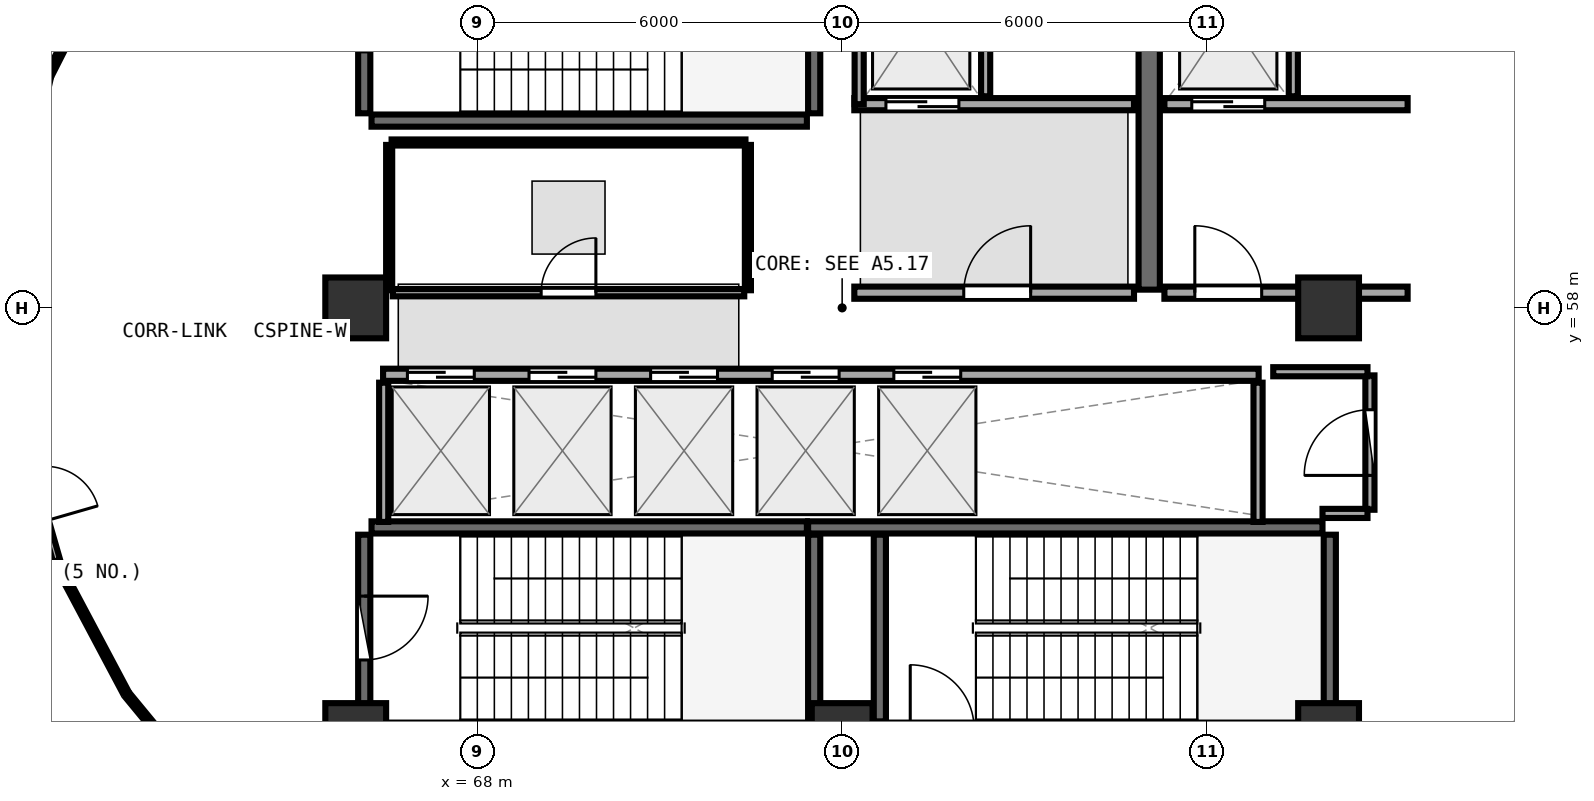
"""IFC4 building model, lengths in metres.
Left out: names, types, materials, properties, quantities, classifications, styles, units other than length and angle.
Written with IfcOpenShell. Run it as: python <this file> out.ifc"""

import sys

from ifc_helpers import new_model, si_unit, direction, frame, frame_2d, origin, origin_2d, place, context, subcontext, project, spatial, rectangle, extrude, element, fill, save


model = new_model("IFC4")
c1 = context("Model", 3, precision=1e-05, world=origin(), true_north=direction((0.0, 1.0)))
c2 = subcontext(c1, "Body", "Model", "MODEL_VIEW")
j1 = project(units=[si_unit("LENGTHUNIT", "METRE"), si_unit("PLANEANGLEUNIT", "RADIAN")], contexts=[c1])
p1 = place(None, origin())
s1 = spatial("IfcSite", under=j1, at=p1, CompositionType="ELEMENT")
p2 = place(p1, origin())
s2 = spatial("IfcBuilding", under=s1, at=p2, CompositionType="ELEMENT")
p3 = place(p2, frame((0.0, 0.0, 238.2)))
s3 = spatial("IfcBuildingStorey", under=s2, at=p3, CompositionType="ELEMENT", Elevation=238.2)
for number, where, z_axis, x_axis in (
    (1, (66.0, 51.0, 0.0), (0.0, 0.0, 1.0), (1.0, 0.0, 0.0)),
    (2, (74.0, 51.0, 0.0), (0.0, 0.0, 1.0), (1.0, 0.0, 0.0)),
    (3, (82.0, 51.0, 0.0), (0.0, 0.0, 1.0), (1.0, 0.0, 0.0)),
    (4, (82.0, 58.0, 0.0), (0.0, 0.0, 1.0), (1.0, 0.0, 0.0)),
    (5, (66.0, 58.0, 0.0), (0.0, 0.0, 1.0), (1.0, 0.0, 0.0)),
):
    element("IfcColumn", number, at=place(p3, frame(where, z_axis=z_axis, x_axis=x_axis)), inside=s3, PredefinedType="PILASTER", context=c2, shape_type="SweptSolid", body=[
        extrude(rectangle(XDim=1.0, YDim=1.0, at=origin_2d()), origin(), (0.0, 0.0, 1.0), 4.76),
    ])
p4 = place(p3, frame((66.26, 61.08, 0.0), z_axis=(0.0, 0.0, 1.0), x_axis=(1.0, 0.0, 0.0)))
e6 = element("IfcWall", 6, at=p4, inside=s3, PredefinedType="SHEAR", context=c2, shape_type="SweptSolid", body=[
    extrude(rectangle(XDim=7.16, YDim=0.2, at=frame_2d((3.58, 0.0))), origin(), (0.0, 0.0, 1.0), 4.36),
])
p5 = place(p3, frame((73.54, 61.2, 0.0), z_axis=(0.0, 0.0, 1.0), x_axis=(0.0, 1.0, 0.0)))
e7 = element("IfcWall", 7, at=p5, inside=s3, PredefinedType="SHEAR", context=c2, shape_type="SweptSolid", body=[
    extrude(rectangle(XDim=3.07, YDim=0.2, at=frame_2d((1.535, 0.0))), origin(), (0.0, 0.0, 1.0), 4.36),
])
p6 = place(p3, frame((66.14, 64.27, 0.0), z_axis=(0.0, 0.0, 1.0), x_axis=(0.0, -1.0, 0.0)))
e8 = element("IfcWall", 8, at=p6, inside=s3, PredefinedType="SHEAR", context=c2, shape_type="SweptSolid", body=[
    extrude(rectangle(XDim=3.07, YDim=0.2, at=frame_2d((1.535, 0.0))), origin(), (0.0, 0.0, 1.0), 4.36),
])
p7 = place(p6, frame((1.01, 0.0, 0.0)))
e9 = element("IfcOpeningElement", 9, at=p7, cuts=e8, PredefinedType="OPENING", context=c2, shape_type="SweptSolid", body=[
    extrude(rectangle(XDim=1.05, YDim=2.1, at=frame_2d((0.525, 1.05))), frame((0.0, 0.11, 0.0), z_axis=(0.0, -1.0, 0.0), x_axis=(1.0, 0.0, 0.0)), (0.0, 0.0, 1.0), 0.22),
])
p8 = place(p3, frame((82.02, 51.2, 0.0), z_axis=(0.0, 0.0, 1.0), x_axis=(0.0, 1.0, 0.0)))
e10 = element("IfcWall", 10, at=p8, inside=s3, PredefinedType="SHEAR", context=c2, shape_type="SweptSolid", body=[
    extrude(rectangle(XDim=3.07, YDim=0.2, at=frame_2d((1.535, 0.0))), origin(), (0.0, 0.0, 1.0), 4.36),
])
p9 = place(p3, frame((81.9, 54.39, 0.0), z_axis=(0.0, 0.0, 1.0), x_axis=(-1.0, 0.0, 0.0)))
e11 = element("IfcWall", 11, at=p9, inside=s3, PredefinedType="SHEAR", context=c2, shape_type="SweptSolid", body=[
    extrude(rectangle(XDim=8.46, YDim=0.2, at=frame_2d((4.23, 0.0))), origin(), (0.0, 0.0, 1.0), 4.36),
])
for number, where, z_axis, x_axis in (
    (12, (74.62, 54.27, 0.0), (0.0, 0.0, 1.0), (0.0, -1.0, 0.0)),
    (13, (73.54, 51.2, 0.0), (0.0, 0.0, 1.0), (0.0, 1.0, 0.0)),
):
    element("IfcWall", number, at=place(p3, frame(where, z_axis=z_axis, x_axis=x_axis)), inside=s3, PredefinedType="SHEAR", context=c2, shape_type="SweptSolid", body=[
        extrude(rectangle(XDim=3.07, YDim=0.2, at=frame_2d((1.535, 0.0))), origin(), (0.0, 0.0, 1.0), 4.36),
    ])
p10 = place(p3, frame((73.42, 54.39, 0.0), z_axis=(0.0, 0.0, 1.0), x_axis=(-1.0, 0.0, 0.0)))
e14 = element("IfcWall", 14, at=p10, inside=s3, PredefinedType="SHEAR", context=c2, shape_type="SweptSolid", body=[
    extrude(rectangle(XDim=7.16, YDim=0.2, at=frame_2d((3.58, 0.0))), origin(), (0.0, 0.0, 1.0), 4.36),
])
p11 = place(p3, frame((66.14, 54.27, 0.0), z_axis=(0.0, 0.0, 1.0), x_axis=(0.0, -1.0, 0.0)))
e15 = element("IfcWall", 15, at=p11, inside=s3, PredefinedType="SHEAR", context=c2, shape_type="SweptSolid", body=[
    extrude(rectangle(XDim=3.07, YDim=0.2, at=frame_2d((1.535, 0.0))), origin(), (0.0, 0.0, 1.0), 4.36),
])
p12 = place(p11, frame((1.01, 0.0, 0.0)))
e16 = element("IfcOpeningElement", 16, at=p12, cuts=e15, PredefinedType="OPENING", context=c2, shape_type="SweptSolid", body=[
    extrude(rectangle(XDim=1.05, YDim=2.1, at=frame_2d((0.525, 1.05))), frame((0.0, 0.11, 0.0), z_axis=(0.0, -1.0, 0.0), x_axis=(1.0, 0.0, 0.0)), (0.0, 0.0, 1.0), 0.22),
])
p13 = place(p3, frame((79.05, 58.3, 0.0), z_axis=(0.0, 0.0, 1.0), x_axis=(0.0, 1.0, 0.0)))
e17 = element("IfcWall", 17, at=p13, inside=s3, PredefinedType="SHEAR", context=c2, shape_type="SweptSolid", body=[
    extrude(rectangle(XDim=6.3, YDim=0.35, at=frame_2d((3.15, 0.0))), origin(), (0.0, 0.0, 1.0), 4.36),
])
p14 = place(p3, frame((74.2, 61.35, 0.0), z_axis=(0.0, 0.0, 1.0), x_axis=(1.0, 0.0, 0.0)))
e18 = element("IfcWall", 18, at=p14, inside=s3, PredefinedType="SOLIDWALL", context=c2, shape_type="SweptSolid", body=[
    extrude(rectangle(XDim=4.6, YDim=0.2, at=frame_2d((2.3, 0.0))), origin(), (0.0, 0.0, 1.0), 4.35),
])
p15 = place(p14, frame((0.52, 0.0, 0.0)))
e19 = element("IfcOpeningElement", 19, at=p15, cuts=e18, PredefinedType="OPENING", context=c2, shape_type="SweptSolid", body=[
    extrude(rectangle(XDim=1.2, YDim=2.15, at=frame_2d((0.6, 1.075))), frame((0.0, 0.11, 0.0), z_axis=(0.0, -1.0, 0.0), x_axis=(1.0, 0.0, 0.0)), (0.0, 0.0, 1.0), 0.22),
])
p16 = place(p3, frame((74.28, 61.35, 0.0), z_axis=(0.0, 0.0, 1.0), x_axis=(0.0, 1.0, 0.0)))
e20 = element("IfcWall", 20, at=p16, inside=s3, PredefinedType="PARTITIONING", context=c2, shape_type="SweptSolid", body=[
    extrude(rectangle(XDim=2.97, YDim=0.15, at=frame_2d((1.485, 0.0))), origin(), (0.0, 0.0, 1.0), 4.35),
])
p17 = place(p3, frame((76.36, 61.48, 0.0), z_axis=(0.0, 0.0, 1.0), x_axis=(0.0, 1.0, 0.0)))
e21 = element("IfcWall", 21, at=p17, inside=s3, PredefinedType="PARTITIONING", context=c2, shape_type="SweptSolid", body=[
    extrude(rectangle(XDim=2.84, YDim=0.15, at=frame_2d((1.42, 0.0))), origin(), (0.0, 0.0, 1.0), 4.35),
])
p18 = place(p3, frame((79.3, 61.35, 0.0), z_axis=(0.0, 0.0, 1.0), x_axis=(1.0, 0.0, 0.0)))
e22 = element("IfcWall", 22, at=p18, inside=s3, PredefinedType="SOLIDWALL", context=c2, shape_type="SweptSolid", body=[
    extrude(rectangle(XDim=4.0, YDim=0.2, at=frame_2d((2.0, 0.0))), origin(), (0.0, 0.0, 1.0), 3.645),
])
p19 = place(p18, frame((0.45, 0.0, 0.0)))
e23 = element("IfcOpeningElement", 23, at=p19, cuts=e22, PredefinedType="OPENING", context=c2, shape_type="SweptSolid", body=[
    extrude(rectangle(XDim=1.2, YDim=2.15, at=frame_2d((0.6, 1.075))), frame((0.0, 0.11, 0.0), z_axis=(0.0, -1.0, 0.0), x_axis=(1.0, 0.0, 0.0)), (0.0, 0.0, 1.0), 0.22),
])
p20 = place(p3, frame((81.42, 61.48, 0.0), z_axis=(0.0, 0.0, 1.0), x_axis=(0.0, 1.0, 0.0)))
e24 = element("IfcWall", 24, at=p20, inside=s3, PredefinedType="PARTITIONING", context=c2, shape_type="SweptSolid", body=[
    extrude(rectangle(XDim=2.84, YDim=0.15, at=frame_2d((1.42, 0.0))), origin(), (0.0, 0.0, 1.0), 4.35),
])
p21 = place(p3, frame((74.2, 58.25, 0.0), z_axis=(0.0, 0.0, 1.0), x_axis=(1.0, 0.0, 0.0)))
e25 = element("IfcWall", 25, at=p21, inside=s3, PredefinedType="SOLIDWALL", context=c2, shape_type="SweptSolid", body=[
    extrude(rectangle(XDim=4.6, YDim=0.2, at=frame_2d((2.3, 0.0))), origin(), (0.0, 0.0, 1.0), 4.35),
])
p22 = place(p21, frame((1.8, 0.0, 0.0)))
e26 = element("IfcOpeningElement", 26, at=p22, cuts=e25, PredefinedType="OPENING", context=c2, shape_type="SweptSolid", body=[
    extrude(rectangle(XDim=1.1, YDim=2.1, at=frame_2d((0.55, 1.05))), frame((0.0, 0.11, 0.0), z_axis=(0.0, -1.0, 0.0), x_axis=(1.0, 0.0, 0.0)), (0.0, 0.0, 1.0), 0.22),
])
p23 = place(p3, frame((79.3, 58.25, 0.0), z_axis=(0.0, 0.0, 1.0), x_axis=(1.0, 0.0, 0.0)))
e27 = element("IfcWall", 27, at=p23, inside=s3, PredefinedType="SOLIDWALL", context=c2, shape_type="SweptSolid", body=[
    extrude(rectangle(XDim=4.0, YDim=0.2, at=frame_2d((2.0, 0.0))), origin(), (0.0, 0.0, 1.0), 2.345),
])
p24 = place(p23, frame((0.5, 0.0, 0.0)))
e28 = element("IfcOpeningElement", 28, at=p24, cuts=e27, PredefinedType="OPENING", context=c2, shape_type="SweptSolid", body=[
    extrude(rectangle(XDim=1.1, YDim=2.1, at=frame_2d((0.55, 1.05))), frame((0.0, 0.11, 0.0), z_axis=(0.0, -1.0, 0.0), x_axis=(1.0, 0.0, 0.0)), (0.0, 0.0, 1.0), 0.22),
])
p25 = place(p3, frame((66.45, 56.9, 0.0), z_axis=(0.0, 0.0, 1.0), x_axis=(1.0, 0.0, 0.0)))
e29 = element("IfcWall", 29, at=p25, inside=s3, PredefinedType="SOLIDWALL", context=c2, shape_type="SweptSolid", body=[
    extrude(rectangle(XDim=14.4, YDim=0.2, at=frame_2d((7.2, 0.0))), origin(), (0.0, 0.0, 1.0), 4.35),
])
p26 = place(p25, frame((0.4, 0.0, 0.0)))
e30 = element("IfcOpeningElement", 30, at=p26, cuts=e29, PredefinedType="OPENING", context=c2, shape_type="SweptSolid", body=[
    extrude(rectangle(XDim=1.1, YDim=2.1, at=frame_2d((0.55, 1.05))), frame((0.0, 0.11, 0.0), z_axis=(0.0, -1.0, 0.0), x_axis=(1.0, 0.0, 0.0)), (0.0, 0.0, 1.0), 0.22),
])
p27 = place(p25, frame((2.4, 0.0, 0.0)))
e31 = element("IfcOpeningElement", 31, at=p27, cuts=e29, PredefinedType="OPENING", context=c2, shape_type="SweptSolid", body=[
    extrude(rectangle(XDim=1.1, YDim=2.1, at=frame_2d((0.55, 1.05))), frame((0.0, 0.11, 0.0), z_axis=(0.0, -1.0, 0.0), x_axis=(1.0, 0.0, 0.0)), (0.0, 0.0, 1.0), 0.22),
])
p28 = place(p25, frame((4.4, 0.0, 0.0)))
e32 = element("IfcOpeningElement", 32, at=p28, cuts=e29, PredefinedType="OPENING", context=c2, shape_type="SweptSolid", body=[
    extrude(rectangle(XDim=1.1, YDim=2.1, at=frame_2d((0.55, 1.05))), frame((0.0, 0.11, 0.0), z_axis=(0.0, -1.0, 0.0), x_axis=(1.0, 0.0, 0.0)), (0.0, 0.0, 1.0), 0.22),
])
p29 = place(p25, frame((6.4, 0.0, 0.0)))
e33 = element("IfcOpeningElement", 33, at=p29, cuts=e29, PredefinedType="OPENING", context=c2, shape_type="SweptSolid", body=[
    extrude(rectangle(XDim=1.1, YDim=2.1, at=frame_2d((0.55, 1.05))), frame((0.0, 0.11, 0.0), z_axis=(0.0, -1.0, 0.0), x_axis=(1.0, 0.0, 0.0)), (0.0, 0.0, 1.0), 0.22),
])
p30 = place(p25, frame((8.4, 0.0, 0.0)))
e34 = element("IfcOpeningElement", 34, at=p30, cuts=e29, PredefinedType="OPENING", context=c2, shape_type="SweptSolid", body=[
    extrude(rectangle(XDim=1.1, YDim=2.1, at=frame_2d((0.55, 1.05))), frame((0.0, 0.11, 0.0), z_axis=(0.0, -1.0, 0.0), x_axis=(1.0, 0.0, 0.0)), (0.0, 0.0, 1.0), 0.22),
])
for number, where, z_axis, x_axis in (
    (35, (66.46, 54.48, 0.0), (0.0, 0.0, 1.0), (0.0, 1.0, 0.0)),
    (36, (80.84, 54.48, 0.0), (0.0, 0.0, 1.0), (0.0, 1.0, 0.0)),
):
    element("IfcWall", number, at=place(p3, frame(where, z_axis=z_axis, x_axis=x_axis)), inside=s3, PredefinedType="PARTITIONING", context=c2, shape_type="SweptSolid", body=[
        extrude(rectangle(XDim=2.29, YDim=0.15, at=frame_2d((1.145, 0.0))), origin(), (0.0, 0.0, 1.0), 4.35),
    ])
p31 = place(p3, frame((82.68, 54.68, 0.0), z_axis=(0.0, 0.0, 1.0), x_axis=(0.0, 1.0, 0.0)))
e37 = element("IfcWall", 37, at=p31, inside=s3, PredefinedType="PARTITIONING", context=c2, shape_type="SweptSolid", body=[
    extrude(rectangle(XDim=2.21, YDim=0.15, at=frame_2d((1.105, 0.0))), origin(), (0.0, 0.0, 1.0), 4.35),
])
p32 = place(p31, frame((0.565, 0.0, 0.0)))
e38 = element("IfcOpeningElement", 38, at=p32, cuts=e37, PredefinedType="OPENING", context=c2, shape_type="SweptSolid", body=[
    extrude(rectangle(XDim=1.08, YDim=2.1, at=frame_2d((0.54, 1.05))), frame((0.0, 0.085, 0.0), z_axis=(0.0, -1.0, 0.0), x_axis=(1.0, 0.0, 0.0)), (0.0, 0.0, 1.0), 0.17),
])
p33 = place(p3, frame((66.61, 58.25, 0.0), z_axis=(0.0, 0.0, 1.0), x_axis=(1.0, 0.0, 0.0)))
e39 = element("IfcWall", 39, at=p33, inside=s3, PredefinedType="PARTITIONING", context=c2, shape_type="SweptSolid", body=[
    extrude(rectangle(XDim=5.78, YDim=0.12, at=frame_2d((2.89, 0.0))), origin(), (0.0, 0.0, 1.0), 4.35),
])
p34 = place(p33, frame((2.44, 0.0, 0.0)))
e40 = element("IfcOpeningElement", 40, at=p34, cuts=e39, PredefinedType="OPENING", context=c2, shape_type="SweptSolid", body=[
    extrude(rectangle(XDim=0.9, YDim=2.08, at=frame_2d((0.45, 1.04))), frame((0.0, 0.07, 0.0), z_axis=(0.0, -1.0, 0.0), x_axis=(1.0, 0.0, 0.0)), (0.0, 0.0, 1.0), 0.14),
])
p35 = place(p3, frame((60.456, 56.013, 0.0), z_axis=(0.0, 0.0, 1.0), x_axis=(0.276788679801, -0.960930812668, 0.0)))
e41 = element("IfcWall", 41, at=p35, inside=s3, PredefinedType="PARTITIONING", context=c2, shape_type="SweptSolid", body=[
    extrude(rectangle(XDim=2.261, YDim=0.12, at=frame_2d((1.13, 0.0))), origin(), (0.0, 0.0, 1.0), 4.35),
])
p36 = place(p35, frame((0.68, 0.0, 0.0)))
e42 = element("IfcOpeningElement", 42, at=p36, cuts=e41, PredefinedType="OPENING", context=c2, shape_type="SweptSolid", body=[
    extrude(rectangle(XDim=0.9, YDim=2.08, at=frame_2d((0.45, 1.04))), frame((0.0, 0.07, 0.0), z_axis=(0.0, -1.0, 0.0), x_axis=(1.0, 0.0, 0.0)), (0.0, 0.0, 1.0), 0.14),
])
p37 = place(p3, frame((81.9, 54.62, 0.0), z_axis=(0.0, 0.0, 1.0), x_axis=(1.0, 0.0, 0.0)))
e43 = element("IfcWall", 43, at=p37, inside=s3, PredefinedType="PARTITIONING", context=c2, shape_type="SweptSolid", body=[
    extrude(rectangle(XDim=0.74, YDim=0.15, at=frame_2d((0.37, 0.0))), origin(), (0.0, 0.0, 1.0), 3.645),
])
p38 = place(p3, frame((82.64, 56.95, 0.0), z_axis=(0.0, 0.0, 1.0), x_axis=(-1.0, 0.0, 0.0)))
e44 = element("IfcWall", 44, at=p38, inside=s3, PredefinedType="PARTITIONING", context=c2, shape_type="SweptSolid", body=[
    extrude(rectangle(XDim=1.55, YDim=0.15, at=frame_2d((0.775, 0.0))), origin(), (0.0, 0.0, 1.0), 3.645),
])
p39 = place(p3, frame((72.45, 58.29, 0.0), z_axis=(0.0, 0.0, 1.0), x_axis=(0.0, 1.0, 0.0)))
e45 = element("IfcWall", 45, at=p39, inside=s3, PredefinedType="PARTITIONING", context=c2, shape_type="SweptSolid", body=[
    extrude(rectangle(XDim=2.39, YDim=0.1, at=frame_2d((1.195, 0.0))), origin(), (0.0, 0.0, 1.0), 4.35),
])
p40 = place(p3, frame((72.41, 60.72, 0.0), z_axis=(0.0, 0.0, 1.0), x_axis=(-1.0, 0.0, 0.0)))
e46 = element("IfcWall", 46, at=p40, inside=s3, PredefinedType="PARTITIONING", context=c2, shape_type="SweptSolid", body=[
    extrude(rectangle(XDim=5.82, YDim=0.1, at=frame_2d((2.91, 0.0))), origin(), (0.0, 0.0, 1.0), 4.35),
])
p41 = place(p3, frame((66.55, 60.68, 0.0), z_axis=(0.0, 0.0, 1.0), x_axis=(0.0, -1.0, 0.0)))
e47 = element("IfcWall", 47, at=p41, inside=s3, PredefinedType="PARTITIONING", context=c2, shape_type="SweptSolid", body=[
    extrude(rectangle(XDim=2.39, YDim=0.1, at=frame_2d((1.195, 0.0))), origin(), (0.0, 0.0, 1.0), 4.35),
])
p42 = place(p3, frame((62.213, 64.314, 0.0), z_axis=(0.0, 0.0, 1.0), x_axis=(-0.452532690557, -0.891747814114, 0.0)))
e48 = element("IfcWall", 48, at=p42, inside=s3, PredefinedType="PARTITIONING", context=c2, shape_type="SweptSolid", body=[
    extrude(rectangle(XDim=2.768, YDim=0.1, at=frame_2d((1.384, 0.0))), origin(), (0.0, 0.0, 1.0), 2.345),
])
p43 = place(p3, frame((61.117, 53.748, 0.0), z_axis=(0.0, 0.0, 1.0), x_axis=(0.469073693437, -0.883159028785, 0.0)))
e49 = element("IfcWall", 49, at=p43, inside=s3, PredefinedType="PARTITIONING", context=c2, shape_type="SweptSolid", body=[
    extrude(rectangle(XDim=2.335, YDim=0.1, at=frame_2d((1.168, 0.0))), origin(), (0.0, 0.0, 1.0), 2.345),
])
p44 = place(p3, frame((62.256, 51.619, 0.0), z_axis=(0.0, 0.0, 1.0), x_axis=(0.636052062508, -0.771646145444, 0.0)))
e50 = element("IfcWall", 50, at=p44, inside=s3, PredefinedType="PARTITIONING", context=c2, shape_type="SweptSolid", body=[
    extrude(rectangle(XDim=2.382, YDim=0.1, at=frame_2d((1.191, 0.0))), origin(), (0.0, 0.0, 1.0), 2.345),
])
p45 = place(p3, frame((82.76, 48.516, 0.0), z_axis=(0.0, 0.0, 1.0), x_axis=(0.66809195956, 0.744078714634, 0.0)))
e51 = element("IfcWall", 51, at=p45, inside=s3, PredefinedType="PARTITIONING", context=c2, shape_type="SweptSolid", body=[
    extrude(rectangle(XDim=5.118, YDim=0.1, at=frame_2d((2.559, 0.0))), origin(), (0.0, 0.0, 1.0), 2.345),
])
p46 = place(p12, origin())
e52 = element("IfcDoor", 52, at=p46, inside=s3, OperationType="SINGLE_SWING_LEFT", PredefinedType="DOOR", context=c2, shape_type="SweptSolid", body=[
    extrude(rectangle(XDim=1.05, YDim=2.1, at=frame_2d((0.525, 1.05))), frame((0.0, 0.025, 0.0), z_axis=(0.0, -1.0, 0.0), x_axis=(1.0, 0.0, 0.0)), (0.0, 0.0, 1.0), 0.05),
])
fill(e16, e52)
p47 = place(p15, origin())
e53 = element("IfcDoor", 53, at=p47, inside=s3, OperationType="DOUBLE_DOOR_SLIDING", PredefinedType="DOOR", context=c2, shape_type="SweptSolid", body=[
    extrude(rectangle(XDim=1.2, YDim=2.15, at=frame_2d((0.6, 1.075))), frame((0.0, 0.025, 0.0), z_axis=(0.0, -1.0, 0.0), x_axis=(1.0, 0.0, 0.0)), (0.0, 0.0, 1.0), 0.05),
])
fill(e19, e53)
p48 = place(p19, origin())
e54 = element("IfcDoor", 54, at=p48, inside=s3, OperationType="DOUBLE_DOOR_SLIDING", PredefinedType="DOOR", context=c2, shape_type="SweptSolid", body=[
    extrude(rectangle(XDim=1.2, YDim=2.15, at=frame_2d((0.6, 1.075))), frame((0.0, 0.025, 0.0), z_axis=(0.0, -1.0, 0.0), x_axis=(1.0, 0.0, 0.0)), (0.0, 0.0, 1.0), 0.05),
])
fill(e23, e54)
p49 = place(p22, frame((1.1, 0.0, 0.0), z_axis=(0.0, 0.0, 1.0), x_axis=(-1.0, 0.0, 0.0)))
e55 = element("IfcDoor", 55, at=p49, inside=s3, OperationType="SINGLE_SWING_LEFT", PredefinedType="DOOR", context=c2, shape_type="SweptSolid", body=[
    extrude(rectangle(XDim=1.1, YDim=2.1, at=frame_2d((0.55, 1.05))), frame((0.0, 0.025, 0.0), z_axis=(0.0, -1.0, 0.0), x_axis=(1.0, 0.0, 0.0)), (0.0, 0.0, 1.0), 0.05),
])
fill(e26, e55)
p50 = place(p24, frame((1.1, 0.0, 0.0), z_axis=(0.0, 0.0, 1.0), x_axis=(-1.0, 0.0, 0.0)))
e56 = element("IfcDoor", 56, at=p50, inside=s3, OperationType="SINGLE_SWING_RIGHT", PredefinedType="DOOR", context=c2, shape_type="SweptSolid", body=[
    extrude(rectangle(XDim=1.1, YDim=2.1, at=frame_2d((0.55, 1.05))), frame((0.0, 0.025, 0.0), z_axis=(0.0, -1.0, 0.0), x_axis=(1.0, 0.0, 0.0)), (0.0, 0.0, 1.0), 0.05),
])
fill(e28, e56)
p51 = place(p26, origin())
e57 = element("IfcDoor", 57, at=p51, inside=s3, OperationType="DOUBLE_DOOR_SLIDING", PredefinedType="DOOR", context=c2, shape_type="SweptSolid", body=[
    extrude(rectangle(XDim=1.1, YDim=2.1, at=frame_2d((0.55, 1.05))), frame((0.0, 0.025, 0.0), z_axis=(0.0, -1.0, 0.0), x_axis=(1.0, 0.0, 0.0)), (0.0, 0.0, 1.0), 0.05),
])
fill(e30, e57)
p52 = place(p27, origin())
e58 = element("IfcDoor", 58, at=p52, inside=s3, OperationType="DOUBLE_DOOR_SLIDING", PredefinedType="DOOR", context=c2, shape_type="SweptSolid", body=[
    extrude(rectangle(XDim=1.1, YDim=2.1, at=frame_2d((0.55, 1.05))), frame((0.0, 0.025, 0.0), z_axis=(0.0, -1.0, 0.0), x_axis=(1.0, 0.0, 0.0)), (0.0, 0.0, 1.0), 0.05),
])
fill(e31, e58)
p53 = place(p28, origin())
e59 = element("IfcDoor", 59, at=p53, inside=s3, OperationType="DOUBLE_DOOR_SLIDING", PredefinedType="DOOR", context=c2, shape_type="SweptSolid", body=[
    extrude(rectangle(XDim=1.1, YDim=2.1, at=frame_2d((0.55, 1.05))), frame((0.0, 0.025, 0.0), z_axis=(0.0, -1.0, 0.0), x_axis=(1.0, 0.0, 0.0)), (0.0, 0.0, 1.0), 0.05),
])
fill(e32, e59)
p54 = place(p29, origin())
e60 = element("IfcDoor", 60, at=p54, inside=s3, OperationType="DOUBLE_DOOR_SLIDING", PredefinedType="DOOR", context=c2, shape_type="SweptSolid", body=[
    extrude(rectangle(XDim=1.1, YDim=2.1, at=frame_2d((0.55, 1.05))), frame((0.0, 0.025, 0.0), z_axis=(0.0, -1.0, 0.0), x_axis=(1.0, 0.0, 0.0)), (0.0, 0.0, 1.0), 0.05),
])
fill(e33, e60)
p55 = place(p30, origin())
e61 = element("IfcDoor", 61, at=p55, inside=s3, OperationType="DOUBLE_DOOR_SLIDING", PredefinedType="DOOR", context=c2, shape_type="SweptSolid", body=[
    extrude(rectangle(XDim=1.1, YDim=2.1, at=frame_2d((0.55, 1.05))), frame((0.0, 0.025, 0.0), z_axis=(0.0, -1.0, 0.0), x_axis=(1.0, 0.0, 0.0)), (0.0, 0.0, 1.0), 0.05),
])
fill(e34, e61)
p56 = place(p32, origin())
e62 = element("IfcDoor", 62, at=p56, inside=s3, OperationType="SINGLE_SWING_LEFT", PredefinedType="DOOR", context=c2, shape_type="SweptSolid", body=[
    extrude(rectangle(XDim=1.08, YDim=2.1, at=frame_2d((0.54, 1.05))), frame((0.0, 0.025, 0.0), z_axis=(0.0, -1.0, 0.0), x_axis=(1.0, 0.0, 0.0)), (0.0, 0.0, 1.0), 0.05),
])
fill(e38, e62)
p57 = place(p34, origin())
e63 = element("IfcDoor", 63, at=p57, inside=s3, OperationType="SINGLE_SWING_RIGHT", PredefinedType="DOOR", context=c2, shape_type="SweptSolid", body=[
    extrude(rectangle(XDim=0.9, YDim=2.08, at=frame_2d((0.45, 1.04))), frame((0.0, 0.025, 0.0), z_axis=(0.0, -1.0, 0.0), x_axis=(1.0, 0.0, 0.0)), (0.0, 0.0, 1.0), 0.05),
])
fill(e40, e63)
save(model, sys.argv[1])
